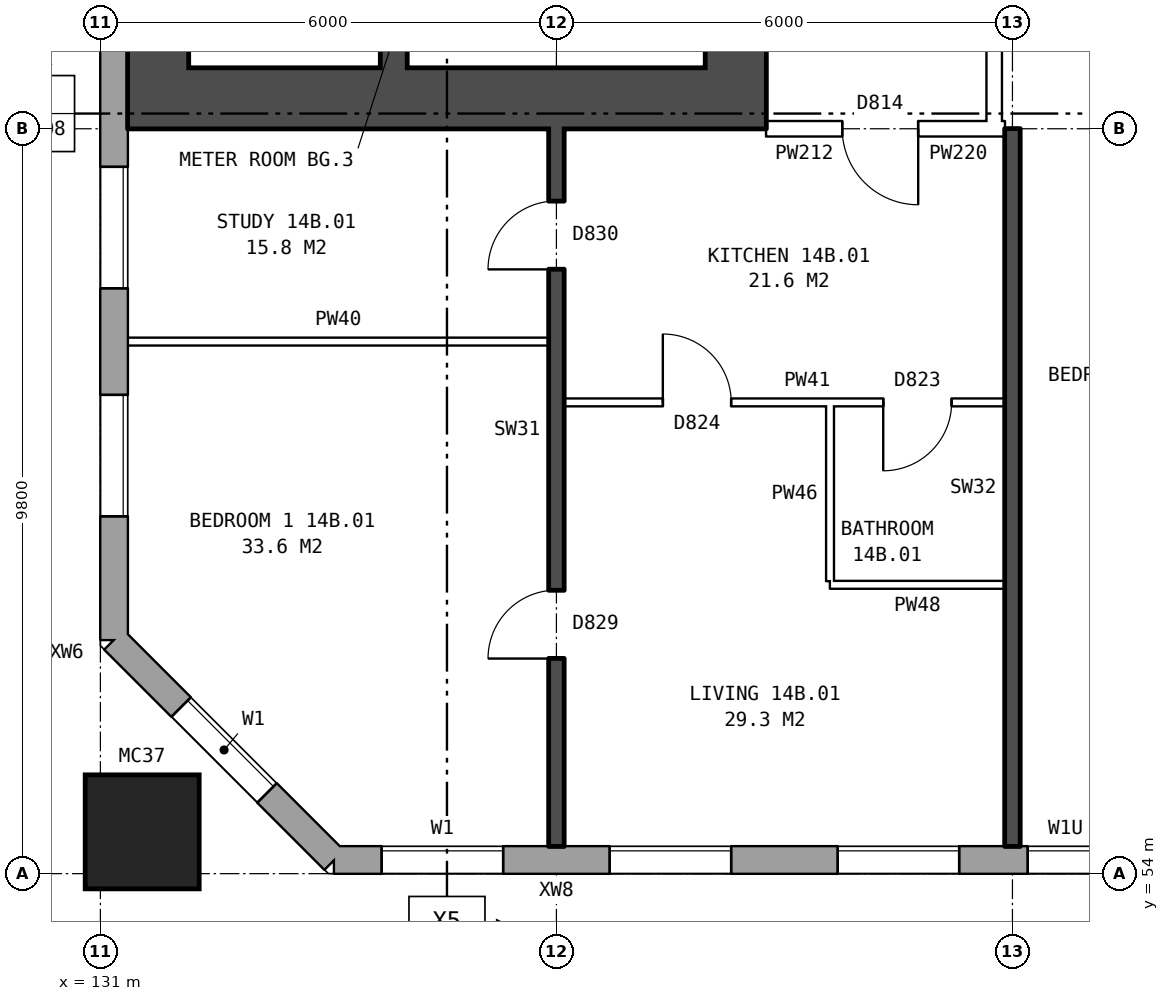
"""IFC4 building model, lengths in metres.
Left out: names, types, materials, properties, quantities, classifications, styles, units other than length and angle.
Written with IfcOpenShell. Run it as: python <this file> out.ifc"""

import sys

from ifc_helpers import new_model, si_unit, direction, frame, frame_2d, origin, origin_2d, place, context, subcontext, project, spatial, rectangle, hollow_rectangle, extrude, element, fill, save


model = new_model("IFC4")
c1 = context("Model", 3, precision=1e-05, world=origin(), true_north=direction((0.0, 1.0)))
c2 = subcontext(c1, "Body", "Model", "MODEL_VIEW")
j1 = project(units=[si_unit("LENGTHUNIT", "METRE"), si_unit("PLANEANGLEUNIT", "RADIAN")], contexts=[c1])
p1 = place(None, origin())
s1 = spatial("IfcSite", under=j1, at=p1, CompositionType="ELEMENT")
p2 = place(p1, origin())
s2 = spatial("IfcBuilding", under=s1, at=p2, CompositionType="ELEMENT")
p3 = place(p2, frame((0.0, 0.0, 53.6)))
s3 = spatial("IfcBuildingStorey", under=s2, at=p3, CompositionType="ELEMENT", Elevation=53.6)
p4 = place(p3, frame((131.55, 54.55, 0.0), z_axis=(0.0, 0.0, 1.0), x_axis=(1.0, 0.0, 0.0)))
e1 = element("IfcColumn", 1, at=p4, inside=s3, PredefinedType="COLUMN", context=c2, shape_type="SweptSolid", body=[
    extrude(hollow_rectangle(XDim=1.5, YDim=1.5, WallThickness=0.08, at=origin_2d()), origin(), (0.0, 0.0, 1.0), 3.1),
])
p5 = place(p3, frame((131.18, 57.075, 0.0), z_axis=(0.0, 0.0, 1.0), x_axis=(0.707106781187, -0.707106781187, 0.0)))
e2 = element("IfcWall", 2, at=p5, inside=s3, PredefinedType="STANDARD", context=c2, shape_type="SweptSolid", body=[
    extrude(rectangle(XDim=4.094, YDim=0.36, at=frame_2d((2.047, 0.0))), origin(), (0.0, 0.0, 1.0), 2.85),
])
p6 = place(p5, frame((1.247, 0.0, 0.8)))
e3 = element("IfcOpeningElement", 3, at=p6, cuts=e2, PredefinedType="OPENING", context=c2, shape_type="SweptSolid", body=[
    extrude(rectangle(XDim=1.6, YDim=1.8, at=frame_2d((0.8, 0.9))), frame((0.0, 0.19, 0.0), z_axis=(0.0, -1.0, 0.0), x_axis=(1.0, 0.0, 0.0)), (0.0, 0.0, 1.0), 0.38),
])
p7 = place(p3, frame((134.075, 54.18, 0.0), z_axis=(0.0, 0.0, 1.0), x_axis=(1.0, 0.0, 0.0)))
e4 = element("IfcWall", 4, at=p7, inside=s3, PredefinedType="STANDARD", context=c2, shape_type="SweptSolid", body=[
    extrude(rectangle(XDim=39.351, YDim=0.36, at=frame_2d((19.675, 0.0))), origin(), (0.0, 0.0, 1.0), 2.85),
])
p8 = place(p7, frame((0.625, 0.0, 0.8)))
e5 = element("IfcOpeningElement", 5, at=p8, cuts=e4, PredefinedType="OPENING", context=c2, shape_type="SweptSolid", body=[
    extrude(rectangle(XDim=1.6, YDim=1.8, at=frame_2d((0.8, 0.9))), frame((0.0, 0.19, 0.0), z_axis=(0.0, -1.0, 0.0), x_axis=(1.0, 0.0, 0.0)), (0.0, 0.0, 1.0), 0.38),
])
p9 = place(p7, frame((3.625, 0.0, 0.8)))
e6 = element("IfcOpeningElement", 6, at=p9, cuts=e4, PredefinedType="OPENING", context=c2, shape_type="SweptSolid", body=[
    extrude(rectangle(XDim=1.6, YDim=1.8, at=frame_2d((0.8, 0.9))), frame((0.0, 0.19, 0.0), z_axis=(0.0, -1.0, 0.0), x_axis=(1.0, 0.0, 0.0)), (0.0, 0.0, 1.0), 0.38),
])
p10 = place(p7, frame((6.625, 0.0, 0.8)))
e7 = element("IfcOpeningElement", 7, at=p10, cuts=e4, PredefinedType="OPENING", context=c2, shape_type="SweptSolid", body=[
    extrude(rectangle(XDim=1.6, YDim=1.8, at=frame_2d((0.8, 0.9))), frame((0.0, 0.19, 0.0), z_axis=(0.0, -1.0, 0.0), x_axis=(1.0, 0.0, 0.0)), (0.0, 0.0, 1.0), 0.38),
])
p11 = place(p7, frame((9.125, 0.0, 1.65)))
e8 = element("IfcOpeningElement", 8, at=p11, cuts=e4, PredefinedType="OPENING", context=c2, shape_type="SweptSolid", body=[
    extrude(rectangle(XDim=1.0, YDim=0.9, at=frame_2d((0.5, 0.45))), frame((0.0, 0.19, 0.0), z_axis=(0.0, -1.0, 0.0), x_axis=(1.0, 0.0, 0.0)), (0.0, 0.0, 1.0), 0.38),
])
p12 = place(p7, frame((12.625, 0.0, 0.8)))
e9 = element("IfcOpeningElement", 9, at=p12, cuts=e4, PredefinedType="OPENING", context=c2, shape_type="SweptSolid", body=[
    extrude(rectangle(XDim=1.6, YDim=1.8, at=frame_2d((0.8, 0.9))), frame((0.0, 0.19, 0.0), z_axis=(0.0, -1.0, 0.0), x_axis=(1.0, 0.0, 0.0)), (0.0, 0.0, 1.0), 0.38),
])
p13 = place(p7, frame((15.625, 0.0, 0.8)))
e10 = element("IfcOpeningElement", 10, at=p13, cuts=e4, PredefinedType="OPENING", context=c2, shape_type="SweptSolid", body=[
    extrude(rectangle(XDim=1.6, YDim=1.8, at=frame_2d((0.8, 0.9))), frame((0.0, 0.19, 0.0), z_axis=(0.0, -1.0, 0.0), x_axis=(1.0, 0.0, 0.0)), (0.0, 0.0, 1.0), 0.38),
])
p14 = place(p7, frame((18.625, 0.0, 0.8)))
e11 = element("IfcOpeningElement", 11, at=p14, cuts=e4, PredefinedType="OPENING", context=c2, shape_type="SweptSolid", body=[
    extrude(rectangle(XDim=1.6, YDim=1.8, at=frame_2d((0.8, 0.9))), frame((0.0, 0.19, 0.0), z_axis=(0.0, -1.0, 0.0), x_axis=(1.0, 0.0, 0.0)), (0.0, 0.0, 1.0), 0.38),
])
p15 = place(p7, frame((21.625, 0.0, 0.8)))
e12 = element("IfcOpeningElement", 12, at=p15, cuts=e4, PredefinedType="OPENING", context=c2, shape_type="SweptSolid", body=[
    extrude(rectangle(XDim=1.6, YDim=1.8, at=frame_2d((0.8, 0.9))), frame((0.0, 0.19, 0.0), z_axis=(0.0, -1.0, 0.0), x_axis=(1.0, 0.0, 0.0)), (0.0, 0.0, 1.0), 0.38),
])
p16 = place(p7, frame((24.625, 0.0, 0.8)))
e13 = element("IfcOpeningElement", 13, at=p16, cuts=e4, PredefinedType="OPENING", context=c2, shape_type="SweptSolid", body=[
    extrude(rectangle(XDim=1.6, YDim=1.8, at=frame_2d((0.8, 0.9))), frame((0.0, 0.19, 0.0), z_axis=(0.0, -1.0, 0.0), x_axis=(1.0, 0.0, 0.0)), (0.0, 0.0, 1.0), 0.38),
])
p17 = place(p7, frame((27.125, 0.0, 0.8)))
e14 = element("IfcOpeningElement", 14, at=p17, cuts=e4, PredefinedType="OPENING", context=c2, shape_type="SweptSolid", body=[
    extrude(rectangle(XDim=0.6, YDim=0.9, at=frame_2d((0.3, 0.45))), frame((0.0, 0.19, 0.0), z_axis=(0.0, -1.0, 0.0), x_axis=(1.0, 0.0, 0.0)), (0.0, 0.0, 1.0), 0.38),
])
p18 = place(p7, frame((30.625, 0.0, 0.8)))
e15 = element("IfcOpeningElement", 15, at=p18, cuts=e4, PredefinedType="OPENING", context=c2, shape_type="SweptSolid", body=[
    extrude(rectangle(XDim=1.6, YDim=1.8, at=frame_2d((0.8, 0.9))), frame((0.0, 0.19, 0.0), z_axis=(0.0, -1.0, 0.0), x_axis=(1.0, 0.0, 0.0)), (0.0, 0.0, 1.0), 0.38),
])
p19 = place(p7, frame((33.625, 0.0, 0.8)))
e16 = element("IfcOpeningElement", 16, at=p19, cuts=e4, PredefinedType="OPENING", context=c2, shape_type="SweptSolid", body=[
    extrude(rectangle(XDim=1.6, YDim=1.8, at=frame_2d((0.8, 0.9))), frame((0.0, 0.19, 0.0), z_axis=(0.0, -1.0, 0.0), x_axis=(1.0, 0.0, 0.0)), (0.0, 0.0, 1.0), 0.38),
])
p20 = place(p7, frame((36.625, 0.0, 0.8)))
e17 = element("IfcOpeningElement", 17, at=p20, cuts=e4, PredefinedType="OPENING", context=c2, shape_type="SweptSolid", body=[
    extrude(rectangle(XDim=1.6, YDim=1.8, at=frame_2d((0.8, 0.9))), frame((0.0, 0.19, 0.0), z_axis=(0.0, -1.0, 0.0), x_axis=(1.0, 0.0, 0.0)), (0.0, 0.0, 1.0), 0.38),
])
p21 = place(p7, frame((10.725, 0.0, 0.15)))
e18 = element("IfcOpeningElement", 18, at=p21, cuts=e4, PredefinedType="OPENING", context=c2, shape_type="SweptSolid", body=[
    extrude(rectangle(XDim=1.0, YDim=0.9, at=frame_2d((0.5, 0.45))), frame((0.0, 0.19, 0.0), z_axis=(0.0, -1.0, 0.0), x_axis=(1.0, 0.0, 0.0)), (0.0, 0.0, 1.0), 0.38),
])
p22 = place(p7, frame((29.075, 0.0, 1.7)))
e19 = element("IfcOpeningElement", 19, at=p22, cuts=e4, PredefinedType="OPENING", context=c2, shape_type="SweptSolid", body=[
    extrude(rectangle(XDim=1.2, YDim=0.9, at=frame_2d((0.6, 0.45))), frame((0.0, 0.19, 0.0), z_axis=(0.0, -1.0, 0.0), x_axis=(1.0, 0.0, 0.0)), (0.0, 0.0, 1.0), 0.38),
])
p23 = place(p3, frame((131.18, 82.925, 0.0), z_axis=(0.0, 0.0, 1.0), x_axis=(0.0, -1.0, 0.0)))
e20 = element("IfcWall", 20, at=p23, inside=s3, PredefinedType="STANDARD", context=c2, shape_type="SweptSolid", body=[
    extrude(rectangle(XDim=25.851, YDim=0.36, at=frame_2d((12.925, 0.0))), origin(), (0.0, 0.0, 1.0), 2.85),
])
p24 = place(p23, frame((1.625, 0.0, 0.8)))
e21 = element("IfcOpeningElement", 21, at=p24, cuts=e20, PredefinedType="OPENING", context=c2, shape_type="SweptSolid", body=[
    extrude(rectangle(XDim=1.6, YDim=1.8, at=frame_2d((0.8, 0.9))), frame((0.0, 0.19, 0.0), z_axis=(0.0, -1.0, 0.0), x_axis=(1.0, 0.0, 0.0)), (0.0, 0.0, 1.0), 0.38),
])
p25 = place(p23, frame((4.625, 0.0, 0.8)))
e22 = element("IfcOpeningElement", 22, at=p25, cuts=e20, PredefinedType="OPENING", context=c2, shape_type="SweptSolid", body=[
    extrude(rectangle(XDim=1.6, YDim=1.8, at=frame_2d((0.8, 0.9))), frame((0.0, 0.19, 0.0), z_axis=(0.0, -1.0, 0.0), x_axis=(1.0, 0.0, 0.0)), (0.0, 0.0, 1.0), 0.38),
])
p26 = place(p23, frame((19.625, 0.0, 0.8)))
e23 = element("IfcOpeningElement", 23, at=p26, cuts=e20, PredefinedType="OPENING", context=c2, shape_type="SweptSolid", body=[
    extrude(rectangle(XDim=1.6, YDim=1.8, at=frame_2d((0.8, 0.9))), frame((0.0, 0.19, 0.0), z_axis=(0.0, -1.0, 0.0), x_axis=(1.0, 0.0, 0.0)), (0.0, 0.0, 1.0), 0.38),
])
p27 = place(p23, frame((22.625, 0.0, 0.8)))
e24 = element("IfcOpeningElement", 24, at=p27, cuts=e20, PredefinedType="OPENING", context=c2, shape_type="SweptSolid", body=[
    extrude(rectangle(XDim=1.6, YDim=1.8, at=frame_2d((0.8, 0.9))), frame((0.0, 0.19, 0.0), z_axis=(0.0, -1.0, 0.0), x_axis=(1.0, 0.0, 0.0)), (0.0, 0.0, 1.0), 0.38),
])
p28 = place(p3, frame((139.36, 64.6, 0.0), z_axis=(0.0, 0.0, 1.0), x_axis=(0.0, 1.0, 0.0)))
e25 = element("IfcWall", 25, at=p28, inside=s3, PredefinedType="SHEAR", context=c2, shape_type="SweptSolid", body=[
    extrude(rectangle(XDim=10.8, YDim=0.8, at=frame_2d((5.4, 0.0))), origin(), (0.0, 0.0, 1.0), 2.85),
])
p29 = place(p28, frame((0.525, 0.0, 0.0)))
e26 = element("IfcOpeningElement", 26, at=p29, cuts=e25, PredefinedType="OPENING", context=c2, shape_type="SweptSolid", body=[
    extrude(rectangle(XDim=1.1, YDim=2.1, at=frame_2d((0.55, 1.05))), frame((0.0, 0.41, 0.0), z_axis=(0.0, -1.0, 0.0), x_axis=(1.0, 0.0, 0.0)), (0.0, 0.0, 1.0), 0.82),
])
p30 = place(p28, frame((9.1, 0.0, 0.0)))
e27 = element("IfcOpeningElement", 27, at=p30, cuts=e25, PredefinedType="OPENING", context=c2, shape_type="SweptSolid", body=[
    extrude(rectangle(XDim=1.1, YDim=2.1, at=frame_2d((0.55, 1.05))), frame((0.0, 0.41, 0.0), z_axis=(0.0, -1.0, 0.0), x_axis=(1.0, 0.0, 0.0)), (0.0, 0.0, 1.0), 0.82),
])
p31 = place(p28, frame((7.325, 0.0, 0.0)))
e28 = element("IfcOpeningElement", 28, at=p31, cuts=e25, PredefinedType="OPENING", context=c2, shape_type="SweptSolid", body=[
    extrude(rectangle(XDim=0.85, YDim=2.1, at=frame_2d((0.425, 1.05))), frame((0.0, 0.41, 0.0), z_axis=(0.0, -1.0, 0.0), x_axis=(1.0, 0.0, 0.0)), (0.0, 0.0, 1.0), 0.82),
])
p32 = place(p3, frame((131.76, 64.6, 0.0), z_axis=(0.0, 0.0, 1.0), x_axis=(0.0, 1.0, 0.0)))
e29 = element("IfcWall", 29, at=p32, inside=s3, PredefinedType="SHEAR", context=c2, shape_type="SweptSolid", body=[
    extrude(rectangle(XDim=10.8, YDim=0.8, at=frame_2d((5.4, 0.0))), origin(), (0.0, 0.0, 1.0), 2.85),
])
p33 = place(p3, frame((139.76, 64.2, 0.0), z_axis=(0.0, 0.0, 1.0), x_axis=(-1.0, 0.0, 0.0)))
e30 = element("IfcWall", 30, at=p33, inside=s3, PredefinedType="SHEAR", context=c2, shape_type="SweptSolid", body=[
    extrude(rectangle(XDim=8.4, YDim=0.8, at=frame_2d((4.2, 0.0))), origin(), (0.0, 0.0, 1.0), 2.85),
])
p34 = place(p3, frame((134.86, 64.6, 0.0), z_axis=(0.0, 0.0, 1.0), x_axis=(0.0, 1.0, 0.0)))
e31 = element("IfcWall", 31, at=p34, inside=s3, PredefinedType="SHEAR", context=c2, shape_type="SweptSolid", body=[
    extrude(rectangle(XDim=6.475, YDim=0.35, at=frame_2d((3.237, 0.0))), origin(), (0.0, 0.0, 1.0), 2.85),
])
p35 = place(p3, frame((142.76, 63.9, 0.0), z_axis=(0.0, 0.0, 1.0), x_axis=(0.0, 1.0, 0.0)))
e32 = element("IfcWall", 32, at=p35, inside=s3, PredefinedType="PARTITIONING", context=c2, shape_type="SweptSolid", body=[
    extrude(rectangle(XDim=12.2, YDim=0.2, at=frame_2d((6.1, 0.0))), origin(), (0.0, 0.0, 1.0), 2.85),
])
p36 = place(p35, frame((5.1, 0.0, 0.0)))
e33 = element("IfcOpeningElement", 33, at=p36, cuts=e32, PredefinedType="OPENING", context=c2, shape_type="SweptSolid", body=[
    extrude(rectangle(XDim=2.0, YDim=2.1, at=frame_2d((1.0, 1.05))), frame((0.0, 0.11, 0.0), z_axis=(0.0, -1.0, 0.0), x_axis=(1.0, 0.0, 0.0)), (0.0, 0.0, 1.0), 0.22),
])
p37 = place(p3, frame((140.6, 57.8, 0.0), z_axis=(0.0, 0.0, 1.0), x_axis=(1.0, 0.0, 0.0)))
e34 = element("IfcWall", 34, at=p37, inside=s3, PredefinedType="PARTITIONING", context=c2, shape_type="SweptSolid", body=[
    extrude(rectangle(XDim=2.3, YDim=0.1, at=frame_2d((1.15, 0.0))), origin(), (0.0, 0.0, 1.0), 2.85),
])
p38 = place(p3, frame((137.1, 60.2, 0.0), z_axis=(0.0, 0.0, 1.0), x_axis=(1.0, 0.0, 0.0)))
e35 = element("IfcWall", 35, at=p38, inside=s3, PredefinedType="PARTITIONING", context=c2, shape_type="SweptSolid", body=[
    extrude(rectangle(XDim=5.8, YDim=0.1, at=frame_2d((2.9, 0.0))), origin(), (0.0, 0.0, 1.0), 2.85),
])
p39 = place(p38, frame((1.3, 0.0, 0.0)))
e36 = element("IfcOpeningElement", 36, at=p39, cuts=e35, PredefinedType="OPENING", context=c2, shape_type="SweptSolid", body=[
    extrude(rectangle(XDim=0.9, YDim=2.1, at=frame_2d((0.45, 1.05))), frame((0.0, 0.06, 0.0), z_axis=(0.0, -1.0, 0.0), x_axis=(1.0, 0.0, 0.0)), (0.0, 0.0, 1.0), 0.12),
])
p40 = place(p38, frame((4.2, 0.0, 0.0)))
e37 = element("IfcOpeningElement", 37, at=p40, cuts=e35, PredefinedType="OPENING", context=c2, shape_type="SweptSolid", body=[
    extrude(rectangle(XDim=0.9, YDim=2.1, at=frame_2d((0.45, 1.05))), frame((0.0, 0.06, 0.0), z_axis=(0.0, -1.0, 0.0), x_axis=(1.0, 0.0, 0.0)), (0.0, 0.0, 1.0), 0.12),
])
p41 = place(p3, frame((131.36, 61.0, 0.0), z_axis=(0.0, 0.0, 1.0), x_axis=(1.0, 0.0, 0.0)))
e38 = element("IfcWall", 38, at=p41, inside=s3, PredefinedType="PARTITIONING", context=c2, shape_type="SweptSolid", body=[
    extrude(rectangle(XDim=5.54, YDim=0.1, at=frame_2d((2.77, 0.0))), origin(), (0.0, 0.0, 1.0), 2.85),
])
p42 = place(p3, frame((139.76, 63.8, 0.0), z_axis=(0.0, 0.0, 1.0), x_axis=(1.0, 0.0, 0.0)))
e39 = element("IfcWall", 39, at=p42, inside=s3, PredefinedType="PARTITIONING", context=c2, shape_type="SweptSolid", body=[
    extrude(rectangle(XDim=3.0, YDim=0.2, at=frame_2d((1.5, 0.0))), origin(), (0.0, 0.0, 1.0), 2.85),
])
p43 = place(p42, frame((1.0, 0.0, 0.0)))
e40 = element("IfcOpeningElement", 40, at=p43, cuts=e39, PredefinedType="OPENING", context=c2, shape_type="SweptSolid", body=[
    extrude(rectangle(XDim=1.0, YDim=2.1, at=frame_2d((0.5, 1.05))), frame((0.0, 0.11, 0.0), z_axis=(0.0, -1.0, 0.0), x_axis=(1.0, 0.0, 0.0)), (0.0, 0.0, 1.0), 0.22),
])
p44 = place(p3, frame((142.76, 63.8, 0.0), z_axis=(0.0, 0.0, 1.0), x_axis=(1.0, 0.0, 0.0)))
e41 = element("IfcWall", 41, at=p44, inside=s3, PredefinedType="PARTITIONING", context=c2, shape_type="SweptSolid", body=[
    extrude(rectangle(XDim=0.14, YDim=0.2, at=frame_2d((0.07, 0.0))), origin(), (0.0, 0.0, 1.0), 2.85),
])
p45 = place(p3, frame((137.0, 54.36, 0.0), z_axis=(0.0, 0.0, 1.0), x_axis=(0.0, 1.0, 0.0)))
e42 = element("IfcWall", 42, at=p45, inside=s3, PredefinedType="SOLIDWALL", context=c2, shape_type="SweptSolid", body=[
    extrude(rectangle(XDim=9.44, YDim=0.2, at=frame_2d((4.72, 0.0))), origin(), (0.0, 0.0, 1.0), 2.85),
])
p46 = place(p45, frame((2.47, 0.0, 0.0)))
e43 = element("IfcOpeningElement", 43, at=p46, cuts=e42, PredefinedType="OPENING", context=c2, shape_type="SweptSolid", body=[
    extrude(rectangle(XDim=0.9, YDim=2.1, at=frame_2d((0.45, 1.05))), frame((0.0, 0.11, 0.0), z_axis=(0.0, -1.0, 0.0), x_axis=(1.0, 0.0, 0.0)), (0.0, 0.0, 1.0), 0.22),
])
p47 = place(p45, frame((7.59, 0.0, 0.0)))
e44 = element("IfcOpeningElement", 44, at=p47, cuts=e42, PredefinedType="OPENING", context=c2, shape_type="SweptSolid", body=[
    extrude(rectangle(XDim=0.9, YDim=2.1, at=frame_2d((0.45, 1.05))), frame((0.0, 0.11, 0.0), z_axis=(0.0, -1.0, 0.0), x_axis=(1.0, 0.0, 0.0)), (0.0, 0.0, 1.0), 0.22),
])
p48 = place(p3, frame((140.6, 57.85, 0.0), z_axis=(0.0, 0.0, 1.0), x_axis=(0.0, 1.0, 0.0)))
e45 = element("IfcWall", 45, at=p48, inside=s3, PredefinedType="PARTITIONING", context=c2, shape_type="SweptSolid", body=[
    extrude(rectangle(XDim=2.3, YDim=0.1, at=frame_2d((1.15, 0.0))), origin(), (0.0, 0.0, 1.0), 2.85),
])
p49 = place(p3, frame((143.0, 54.36, 0.0), z_axis=(0.0, 0.0, 1.0), x_axis=(0.0, 1.0, 0.0)))
e46 = element("IfcWall", 46, at=p49, inside=s3, PredefinedType="SOLIDWALL", context=c2, shape_type="SweptSolid", body=[
    extrude(rectangle(XDim=9.44, YDim=0.2, at=frame_2d((4.72, 0.0))), origin(), (0.0, 0.0, 1.0), 2.85),
])
p50 = place(p6, origin())
e47 = element("IfcWindow", 47, at=p50, inside=s3, PartitioningType="SINGLE_PANEL", PredefinedType="WINDOW", context=c2, shape_type="SweptSolid", body=[
    extrude(rectangle(XDim=1.6, YDim=1.8, at=frame_2d((0.8, 0.9))), frame((0.0, 0.15, 0.0), z_axis=(0.0, -1.0, 0.0), x_axis=(1.0, 0.0, 0.0)), (0.0, 0.0, 1.0), 0.06),
])
fill(e3, e47)
p51 = place(p8, origin())
e48 = element("IfcWindow", 48, at=p51, inside=s3, PartitioningType="SINGLE_PANEL", PredefinedType="WINDOW", context=c2, shape_type="SweptSolid", body=[
    extrude(rectangle(XDim=1.6, YDim=1.8, at=frame_2d((0.8, 0.9))), frame((0.0, 0.15, 0.0), z_axis=(0.0, -1.0, 0.0), x_axis=(1.0, 0.0, 0.0)), (0.0, 0.0, 1.0), 0.06),
])
fill(e5, e48)
p52 = place(p9, origin())
e49 = element("IfcWindow", 49, at=p52, inside=s3, PartitioningType="SINGLE_PANEL", PredefinedType="WINDOW", context=c2, shape_type="SweptSolid", body=[
    extrude(rectangle(XDim=1.6, YDim=1.8, at=frame_2d((0.8, 0.9))), frame((0.0, 0.15, 0.0), z_axis=(0.0, -1.0, 0.0), x_axis=(1.0, 0.0, 0.0)), (0.0, 0.0, 1.0), 0.06),
])
fill(e6, e49)
p53 = place(p10, origin())
e50 = element("IfcWindow", 50, at=p53, inside=s3, PartitioningType="SINGLE_PANEL", PredefinedType="WINDOW", context=c2, shape_type="SweptSolid", body=[
    extrude(rectangle(XDim=1.6, YDim=1.8, at=frame_2d((0.8, 0.9))), frame((0.0, 0.15, 0.0), z_axis=(0.0, -1.0, 0.0), x_axis=(1.0, 0.0, 0.0)), (0.0, 0.0, 1.0), 0.06),
])
fill(e7, e50)
p54 = place(p11, origin())
e51 = element("IfcWindow", 51, at=p54, inside=s3, PartitioningType="SINGLE_PANEL", PredefinedType="WINDOW", context=c2, shape_type="SweptSolid", body=[
    extrude(rectangle(XDim=1.0, YDim=0.9, at=frame_2d((0.5, 0.45))), frame((0.0, 0.15, 0.0), z_axis=(0.0, -1.0, 0.0), x_axis=(1.0, 0.0, 0.0)), (0.0, 0.0, 1.0), 0.06),
])
fill(e8, e51)
p55 = place(p26, origin())
e52 = element("IfcWindow", 52, at=p55, inside=s3, PartitioningType="SINGLE_PANEL", PredefinedType="WINDOW", context=c2, shape_type="SweptSolid", body=[
    extrude(rectangle(XDim=1.6, YDim=1.8, at=frame_2d((0.8, 0.9))), frame((0.0, 0.15, 0.0), z_axis=(0.0, -1.0, 0.0), x_axis=(1.0, 0.0, 0.0)), (0.0, 0.0, 1.0), 0.06),
])
fill(e23, e52)
p56 = place(p27, origin())
e53 = element("IfcWindow", 53, at=p56, inside=s3, PartitioningType="SINGLE_PANEL", PredefinedType="WINDOW", context=c2, shape_type="SweptSolid", body=[
    extrude(rectangle(XDim=1.6, YDim=1.8, at=frame_2d((0.8, 0.9))), frame((0.0, 0.15, 0.0), z_axis=(0.0, -1.0, 0.0), x_axis=(1.0, 0.0, 0.0)), (0.0, 0.0, 1.0), 0.06),
])
fill(e24, e53)
p57 = place(p46, origin())
e54 = element("IfcDoor", 54, at=p57, inside=s3, OperationType="SINGLE_SWING_LEFT", PredefinedType="DOOR", context=c2, shape_type="SweptSolid", body=[
    extrude(rectangle(XDim=0.9, YDim=2.1, at=frame_2d((0.45, 1.05))), frame((0.0, 0.025, 0.0), z_axis=(0.0, -1.0, 0.0), x_axis=(1.0, 0.0, 0.0)), (0.0, 0.0, 1.0), 0.05),
])
fill(e43, e54)
p58 = place(p47, origin())
e55 = element("IfcDoor", 55, at=p58, inside=s3, OperationType="SINGLE_SWING_LEFT", PredefinedType="DOOR", context=c2, shape_type="SweptSolid", body=[
    extrude(rectangle(XDim=0.9, YDim=2.1, at=frame_2d((0.45, 1.05))), frame((0.0, 0.025, 0.0), z_axis=(0.0, -1.0, 0.0), x_axis=(1.0, 0.0, 0.0)), (0.0, 0.0, 1.0), 0.05),
])
fill(e44, e55)
p59 = place(p43, frame((1.0, 0.0, 0.0), z_axis=(0.0, 0.0, 1.0), x_axis=(-1.0, 0.0, 0.0)))
e56 = element("IfcDoor", 56, at=p59, inside=s3, OperationType="SINGLE_SWING_LEFT", PredefinedType="DOOR", context=c2, shape_type="SweptSolid", body=[
    extrude(rectangle(XDim=1.0, YDim=2.1, at=frame_2d((0.5, 1.05))), frame((0.0, 0.025, 0.0), z_axis=(0.0, -1.0, 0.0), x_axis=(1.0, 0.0, 0.0)), (0.0, 0.0, 1.0), 0.05),
])
fill(e40, e56)
p60 = place(p39, origin())
e57 = element("IfcDoor", 57, at=p60, inside=s3, OperationType="SINGLE_SWING_LEFT", PredefinedType="DOOR", context=c2, shape_type="SweptSolid", body=[
    extrude(rectangle(XDim=0.9, YDim=2.1, at=frame_2d((0.45, 1.05))), frame((0.0, 0.025, 0.0), z_axis=(0.0, -1.0, 0.0), x_axis=(1.0, 0.0, 0.0)), (0.0, 0.0, 1.0), 0.05),
])
fill(e36, e57)
p61 = place(p40, frame((0.9, 0.0, 0.0), z_axis=(0.0, 0.0, 1.0), x_axis=(-1.0, 0.0, 0.0)))
e58 = element("IfcDoor", 58, at=p61, inside=s3, OperationType="SINGLE_SWING_RIGHT", PredefinedType="DOOR", context=c2, shape_type="SweptSolid", body=[
    extrude(rectangle(XDim=0.9, YDim=2.1, at=frame_2d((0.45, 1.05))), frame((0.0, 0.025, 0.0), z_axis=(0.0, -1.0, 0.0), x_axis=(1.0, 0.0, 0.0)), (0.0, 0.0, 1.0), 0.05),
])
fill(e37, e58)
save(model, sys.argv[1])
